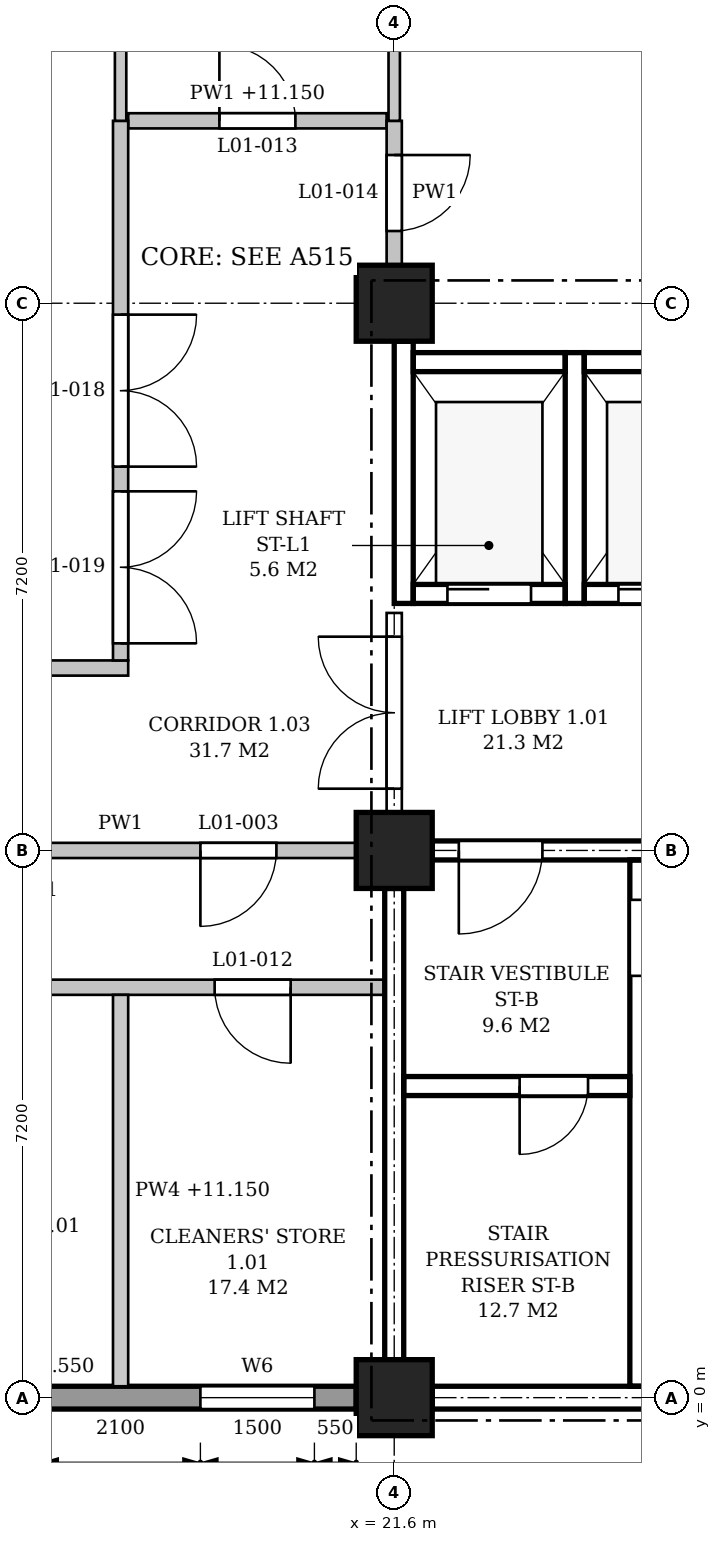
"""IFC4 building model, lengths in metres.
Left out: names, types, materials, properties, quantities, classifications, styles, units other than length and angle.
Written with IfcOpenShell. Run it as: python <this file> out.ifc"""

import sys

from ifc_helpers import new_model, si_unit, direction, frame, frame_2d, origin, origin_2d, place, context, subcontext, project, spatial, polyline, rectangle, outline, extrude, element, fill, save


model = new_model("IFC4")
c1 = context("Model", 3, precision=1e-05, world=origin(), true_north=direction((0.0, 1.0)))
c2 = subcontext(c1, "Body", "Model", "MODEL_VIEW")
j1 = project(units=[si_unit("LENGTHUNIT", "METRE"), si_unit("PLANEANGLEUNIT", "RADIAN")], contexts=[c1])
p1 = place(None, origin())
s1 = spatial("IfcSite", under=j1, at=p1, CompositionType="ELEMENT")
p2 = place(p1, origin())
s2 = spatial("IfcBuilding", under=s1, at=p2, CompositionType="ELEMENT")
p3 = place(p2, frame((0.0, 0.0, 6.0)))
s3 = spatial("IfcBuildingStorey", under=s2, at=p3, CompositionType="ELEMENT", Elevation=6.0)
for number, where, z_axis, x_axis in (
    (1, (21.6, 0.0, 0.0), (0.0, 0.0, 1.0), (1.0, 0.0, 0.0)),
    (2, (21.6, 7.2, 0.0), (0.0, 0.0, 1.0), (1.0, 0.0, 0.0)),
    (3, (21.6, 14.4, 0.0), (0.0, 0.0, 1.0), (1.0, 0.0, 0.0)),
):
    element("IfcColumn", number, at=place(p3, frame(where, z_axis=z_axis, x_axis=x_axis)), inside=s3, PredefinedType="COLUMN", context=c2, shape_type="SweptSolid", body=[
        extrude(rectangle(XDim=1.0, YDim=1.0, at=origin_2d()), origin(), (0.0, 0.0, 1.0), 5.4),
    ])
p4 = place(p3, frame((14.9, 0.0, 0.0), z_axis=(0.0, 0.0, 1.0), x_axis=(1.0, 0.0, 0.0)))
e4 = element("IfcWall", 4, at=p4, inside=s3, PredefinedType="STANDARD", context=c2, shape_type="SweptSolid", body=[
    extrude(rectangle(XDim=6.2, YDim=0.3, at=frame_2d((3.1, 0.0))), origin(), (0.0, 0.0, 1.0), 4.55),
])
p5 = place(p4, frame((0.55, 0.0, 0.9)))
e5 = element("IfcOpeningElement", 5, at=p5, cuts=e4, PredefinedType="OPENING", context=c2, shape_type="SweptSolid", body=[
    extrude(outline(polyline([(0.0, 0.0), (1.5, 0.0), (1.5, 2.85), (0.75, 3.6), (0.0, 2.85), (0.0, 0.0)])), frame((0.0, 0.16, 0.0), z_axis=(0.0, -1.0, 0.0), x_axis=(1.0, 0.0, 0.0)), (0.0, 0.0, 1.0), 0.32),
])
p6 = place(p4, frame((4.15, 0.0, 0.9)))
e6 = element("IfcOpeningElement", 6, at=p6, cuts=e4, PredefinedType="OPENING", context=c2, shape_type="SweptSolid", body=[
    extrude(outline(polyline([(0.0, 0.0), (1.5, 0.0), (1.5, 2.85), (0.75, 3.6), (0.0, 2.85), (0.0, 0.0)])), frame((0.0, 0.16, 0.0), z_axis=(0.0, -1.0, 0.0), x_axis=(1.0, 0.0, 0.0)), (0.0, 0.0, 1.0), 0.32),
])
p7 = place(p3, frame((22.1, 0.0, 0.0), z_axis=(0.0, 0.0, 1.0), x_axis=(1.0, 0.0, 0.0)))
e7 = element("IfcWall", 7, at=p7, inside=s3, PredefinedType="STANDARD", context=c2, shape_type="SweptSolid", body=[
    extrude(rectangle(XDim=6.2, YDim=0.3, at=frame_2d((3.1, 0.0))), origin(), (0.0, 0.0, 1.0), 4.55),
])
p8 = place(p7, frame((4.45, 0.0, 0.9)))
e8 = element("IfcOpeningElement", 8, at=p8, cuts=e7, PredefinedType="OPENING", context=c2, shape_type="SweptSolid", body=[
    extrude(outline(polyline([(0.0, 0.0), (0.9, 0.0), (0.9, 3.15), (0.45, 3.6), (0.0, 3.15), (0.0, 0.0)])), frame((0.0, 0.16, 0.0), z_axis=(0.0, -1.0, 0.0), x_axis=(1.0, 0.0, 0.0)), (0.0, 0.0, 1.0), 0.32),
])
p9 = place(p3, frame((22.1, 7.2, 0.0), z_axis=(0.0, 0.0, 1.0), x_axis=(1.0, 0.0, 0.0)))
e9 = element("IfcWall", 9, at=p9, inside=s3, PredefinedType="SHEAR", context=c2, shape_type="SweptSolid", body=[
    extrude(rectangle(XDim=6.2, YDim=0.25, at=frame_2d((3.1, 0.0))), origin(), (0.0, 0.0, 1.0), 4.4),
])
p10 = place(p9, frame((0.35, 0.0, 0.0)))
e10 = element("IfcOpeningElement", 10, at=p10, cuts=e9, PredefinedType="OPENING", context=c2, shape_type="SweptSolid", body=[
    extrude(rectangle(XDim=1.1, YDim=2.1, at=frame_2d((0.55, 1.05))), frame((0.0, 0.135, 0.0), z_axis=(0.0, -1.0, 0.0), x_axis=(1.0, 0.0, 0.0)), (0.0, 0.0, 1.0), 0.27),
])
p11 = place(p3, frame((21.6, 0.5, 0.0), z_axis=(0.0, 0.0, 1.0), x_axis=(0.0, 1.0, 0.0)))
e11 = element("IfcWall", 11, at=p11, inside=s3, PredefinedType="SHEAR", context=c2, shape_type="SweptSolid", body=[
    extrude(rectangle(XDim=6.2, YDim=0.25, at=frame_2d((3.1, 0.0))), origin(), (0.0, 0.0, 1.0), 4.4),
])
p12 = place(p3, frame((24.925, 0.15, 0.0), z_axis=(0.0, 0.0, 1.0), x_axis=(0.0, 1.0, 0.0)))
e12 = element("IfcWall", 12, at=p12, inside=s3, PredefinedType="SHEAR", context=c2, shape_type="SweptSolid", body=[
    extrude(rectangle(XDim=6.925, YDim=0.45, at=frame_2d((3.462, 0.0))), origin(), (0.0, 0.0, 1.0), 5.15),
])
p13 = place(p12, frame((5.4, 0.0, 0.0)))
e13 = element("IfcOpeningElement", 13, at=p13, cuts=e12, PredefinedType="OPENING", context=c2, shape_type="SweptSolid", body=[
    extrude(rectangle(XDim=1.0, YDim=2.1, at=frame_2d((0.5, 1.05))), frame((0.0, 0.235, 0.0), z_axis=(0.0, -1.0, 0.0), x_axis=(1.0, 0.0, 0.0)), (0.0, 0.0, 1.0), 0.47),
])
p14 = place(p3, frame((21.725, 4.1, 0.0), z_axis=(0.0, 0.0, 1.0), x_axis=(1.0, 0.0, 0.0)))
e14 = element("IfcWall", 14, at=p14, inside=s3, PredefinedType="SHEAR", context=c2, shape_type="SweptSolid", body=[
    extrude(rectangle(XDim=2.975, YDim=0.25, at=frame_2d((1.487, 0.0))), origin(), (0.0, 0.0, 1.0), 5.15),
])
p15 = place(p14, frame((1.525, 0.0, 0.0)))
e15 = element("IfcOpeningElement", 15, at=p15, cuts=e14, PredefinedType="OPENING", context=c2, shape_type="SweptSolid", body=[
    extrude(rectangle(XDim=0.9, YDim=2.1, at=frame_2d((0.45, 1.05))), frame((0.0, 0.135, 0.0), z_axis=(0.0, -1.0, 0.0), x_axis=(1.0, 0.0, 0.0)), (0.0, 0.0, 1.0), 0.27),
])
p16 = place(p3, frame((21.725, 10.45, -0.25), z_axis=(0.0, 0.0, 1.0), x_axis=(0.0, 1.0, 0.0)))
e16 = element("IfcWall", 16, at=p16, inside=s3, PredefinedType="SHEAR", context=c2, shape_type="SweptSolid", body=[
    extrude(rectangle(XDim=3.45, YDim=0.25, at=frame_2d((1.725, 0.0))), origin(), (0.0, 0.0, 1.0), 4.65),
])
p17 = place(p3, frame((23.975, 10.45, -0.25), z_axis=(0.0, 0.0, 1.0), x_axis=(0.0, 1.0, 0.0)))
e17 = element("IfcWall", 17, at=p17, inside=s3, PredefinedType="SHEAR", context=c2, shape_type="SweptSolid", body=[
    extrude(rectangle(XDim=3.3, YDim=0.25, at=frame_2d((1.65, 0.0))), origin(), (0.0, 0.0, 1.0), 5.4),
])
p18 = place(p3, frame((21.85, 10.575, -0.25), z_axis=(0.0, 0.0, 1.0), x_axis=(1.0, 0.0, 0.0)))
e18 = element("IfcWall", 18, at=p18, inside=s3, PredefinedType="SHEAR", context=c2, shape_type="SweptSolid", body=[
    extrude(rectangle(XDim=2.0, YDim=0.25, at=frame_2d((1.0, 0.0))), origin(), (0.0, 0.0, 1.0), 5.4),
])
p19 = place(p18, frame((0.45, 0.0, 0.25)))
e19 = element("IfcOpeningElement", 19, at=p19, cuts=e18, PredefinedType="OPENING", context=c2, shape_type="SweptSolid", body=[
    extrude(rectangle(XDim=1.1, YDim=2.1, at=frame_2d((0.55, 1.05))), frame((0.0, 0.135, 0.0), z_axis=(0.0, -1.0, 0.0), x_axis=(1.0, 0.0, 0.0)), (0.0, 0.0, 1.0), 0.27),
])
p20 = place(p3, frame((21.85, 13.625, -0.25), z_axis=(0.0, 0.0, 1.0), x_axis=(1.0, 0.0, 0.0)))
e20 = element("IfcWall", 20, at=p20, inside=s3, PredefinedType="SHEAR", context=c2, shape_type="SweptSolid", body=[
    extrude(rectangle(XDim=2.0, YDim=0.25, at=frame_2d((1.0, 0.0))), origin(), (0.0, 0.0, 1.0), 5.4),
])
p21 = place(p3, frame((24.1, 10.575, -0.25), z_axis=(0.0, 0.0, 1.0), x_axis=(1.0, 0.0, 0.0)))
e21 = element("IfcWall", 21, at=p21, inside=s3, PredefinedType="SHEAR", context=c2, shape_type="SweptSolid", body=[
    extrude(rectangle(XDim=2.0, YDim=0.25, at=frame_2d((1.0, 0.0))), origin(), (0.0, 0.0, 1.0), 5.4),
])
p22 = place(p21, frame((0.45, 0.0, 0.25)))
e22 = element("IfcOpeningElement", 22, at=p22, cuts=e21, PredefinedType="OPENING", context=c2, shape_type="SweptSolid", body=[
    extrude(rectangle(XDim=1.1, YDim=2.1, at=frame_2d((0.55, 1.05))), frame((0.0, 0.135, 0.0), z_axis=(0.0, -1.0, 0.0), x_axis=(1.0, 0.0, 0.0)), (0.0, 0.0, 1.0), 0.27),
])
p23 = place(p3, frame((24.1, 13.625, -0.25), z_axis=(0.0, 0.0, 1.0), x_axis=(1.0, 0.0, 0.0)))
e23 = element("IfcWall", 23, at=p23, inside=s3, PredefinedType="SHEAR", context=c2, shape_type="SweptSolid", body=[
    extrude(rectangle(XDim=2.0, YDim=0.25, at=frame_2d((1.0, 0.0))), origin(), (0.0, 0.0, 1.0), 5.4),
])
p24 = place(p3, frame((7.325, 5.4, 0.0), z_axis=(0.0, 0.0, 1.0), x_axis=(1.0, 0.0, 0.0)))
e24 = element("IfcWall", 24, at=p24, inside=s3, PredefinedType="PARTITIONING", context=c2, shape_type="SweptSolid", body=[
    extrude(outline(polyline([(0.0, 0.0), (14.15, 0.0), (14.15, 4.4), (14.025, 4.4), (14.025, 5.15), (7.325, 5.15), (7.325, 4.4), (6.825, 4.4), (6.825, 5.15), (0.125, 5.15), (0.125, 4.4), (0.0, 4.4), (0.0, 0.0)])), frame((0.0, 0.1, 0.0), z_axis=(0.0, -1.0, 0.0), x_axis=(1.0, 0.0, 0.0)), (0.0, 0.0, 1.0), 0.2),
])
p25 = place(p24, frame((1.238, 0.0, 0.0)))
e25 = element("IfcOpeningElement", 25, at=p25, cuts=e24, PredefinedType="OPENING", context=c2, shape_type="SweptSolid", body=[
    extrude(rectangle(XDim=1.0, YDim=2.1, at=frame_2d((0.5, 1.05))), frame((0.0, 0.11, 0.0), z_axis=(0.0, -1.0, 0.0), x_axis=(1.0, 0.0, 0.0)), (0.0, 0.0, 1.0), 0.22),
])
p26 = place(p24, frame((4.775, 0.0, 0.0)))
e26 = element("IfcOpeningElement", 26, at=p26, cuts=e24, PredefinedType="OPENING", context=c2, shape_type="SweptSolid", body=[
    extrude(rectangle(XDim=1.0, YDim=2.1, at=frame_2d((0.5, 1.05))), frame((0.0, 0.11, 0.0), z_axis=(0.0, -1.0, 0.0), x_axis=(1.0, 0.0, 0.0)), (0.0, 0.0, 1.0), 0.22),
])
p27 = place(p24, frame((8.375, 0.0, 0.0)))
e27 = element("IfcOpeningElement", 27, at=p27, cuts=e24, PredefinedType="OPENING", context=c2, shape_type="SweptSolid", body=[
    extrude(rectangle(XDim=1.0, YDim=2.1, at=frame_2d((0.5, 1.05))), frame((0.0, 0.11, 0.0), z_axis=(0.0, -1.0, 0.0), x_axis=(1.0, 0.0, 0.0)), (0.0, 0.0, 1.0), 0.22),
])
p28 = place(p24, frame((11.913, 0.0, 0.0)))
e28 = element("IfcOpeningElement", 28, at=p28, cuts=e24, PredefinedType="OPENING", context=c2, shape_type="SweptSolid", body=[
    extrude(rectangle(XDim=1.0, YDim=2.1, at=frame_2d((0.5, 1.05))), frame((0.0, 0.11, 0.0), z_axis=(0.0, -1.0, 0.0), x_axis=(1.0, 0.0, 0.0)), (0.0, 0.0, 1.0), 0.22),
])
p29 = place(p3, frame((14.9, 7.2, 0.0), z_axis=(0.0, 0.0, 1.0), x_axis=(1.0, 0.0, 0.0)))
e29 = element("IfcWall", 29, at=p29, inside=s3, PredefinedType="PARTITIONING", context=c2, shape_type="SweptSolid", body=[
    extrude(rectangle(XDim=6.2, YDim=0.2, at=frame_2d((3.1, 0.0))), origin(), (0.0, 0.0, 1.0), 4.4),
])
p30 = place(p29, frame((4.15, 0.0, 0.0)))
e30 = element("IfcOpeningElement", 30, at=p30, cuts=e29, PredefinedType="OPENING", context=c2, shape_type="SweptSolid", body=[
    extrude(rectangle(XDim=1.0, YDim=2.1, at=frame_2d((0.5, 1.05))), frame((0.0, 0.11, 0.0), z_axis=(0.0, -1.0, 0.0), x_axis=(1.0, 0.0, 0.0)), (0.0, 0.0, 1.0), 0.22),
])
p31 = place(p3, frame((3.5, 9.6, 0.0), z_axis=(0.0, 0.0, 1.0), x_axis=(1.0, 0.0, 0.0)))
e31 = element("IfcWall", 31, at=p31, inside=s3, PredefinedType="PARTITIONING", context=c2, shape_type="SweptSolid", body=[
    extrude(outline(polyline([(0.0, 0.0), (14.6, 0.0), (14.6, 5.15), (11.15, 5.15), (11.15, 4.4), (10.65, 4.4), (10.65, 5.15), (3.95, 5.15), (3.95, 4.4), (3.45, 4.4), (3.45, 5.15), (0.0, 5.15), (0.0, 0.0)])), frame((0.0, 0.1, 0.0), z_axis=(0.0, -1.0, 0.0), x_axis=(1.0, 0.0, 0.0)), (0.0, 0.0, 1.0), 0.2),
])
p32 = place(p31, frame((1.4, 0.0, 0.0)))
e32 = element("IfcOpeningElement", 32, at=p32, cuts=e31, PredefinedType="OPENING", context=c2, shape_type="SweptSolid", body=[
    extrude(rectangle(XDim=1.0, YDim=2.1, at=frame_2d((0.5, 1.05))), frame((0.0, 0.11, 0.0), z_axis=(0.0, -1.0, 0.0), x_axis=(1.0, 0.0, 0.0)), (0.0, 0.0, 1.0), 0.22),
])
p33 = place(p31, frame((5.0, 0.0, 0.0)))
e33 = element("IfcOpeningElement", 33, at=p33, cuts=e31, PredefinedType="OPENING", context=c2, shape_type="SweptSolid", body=[
    extrude(rectangle(XDim=1.0, YDim=2.1, at=frame_2d((0.5, 1.05))), frame((0.0, 0.11, 0.0), z_axis=(0.0, -1.0, 0.0), x_axis=(1.0, 0.0, 0.0)), (0.0, 0.0, 1.0), 0.22),
])
p34 = place(p3, frame((18.1, 16.8, 0.0), z_axis=(0.0, 0.0, 1.0), x_axis=(1.0, 0.0, 0.0)))
e34 = element("IfcWall", 34, at=p34, inside=s3, PredefinedType="PARTITIONING", context=c2, shape_type="SweptSolid", body=[
    extrude(outline(polyline([(0.0, 0.0), (3.4, 0.0), (3.4, 4.4), (3.25, 4.4), (3.25, 5.15), (0.0, 5.15), (0.0, 0.0)])), frame((0.0, 0.1, 0.0), z_axis=(0.0, -1.0, 0.0), x_axis=(1.0, 0.0, 0.0)), (0.0, 0.0, 1.0), 0.2),
])
p35 = place(p34, frame((1.2, 0.0, 0.0)))
e35 = element("IfcOpeningElement", 35, at=p35, cuts=e34, PredefinedType="OPENING", context=c2, shape_type="SweptSolid", body=[
    extrude(rectangle(XDim=1.0, YDim=2.1, at=frame_2d((0.5, 1.05))), frame((0.0, 0.11, 0.0), z_axis=(0.0, -1.0, 0.0), x_axis=(1.0, 0.0, 0.0)), (0.0, 0.0, 1.0), 0.22),
])
p36 = place(p3, frame((18.0, 0.15, 0.0), z_axis=(0.0, 0.0, 1.0), x_axis=(0.0, 1.0, 0.0)))
e36 = element("IfcWall", 36, at=p36, inside=s3, PredefinedType="PARTITIONING", context=c2, shape_type="SweptSolid", body=[
    extrude(outline(polyline([(0.0, 0.0), (5.15, 0.0), (5.15, 5.15), (0.1, 5.15), (0.1, 4.55), (0.0, 4.55), (0.0, 0.0)])), frame((0.0, 0.1, 0.0), z_axis=(0.0, -1.0, 0.0), x_axis=(1.0, 0.0, 0.0)), (0.0, 0.0, 1.0), 0.2),
])
p37 = place(p3, frame((18.0, 9.7, 0.0), z_axis=(0.0, 0.0, 1.0), x_axis=(0.0, 1.0, 0.0)))
e37 = element("IfcWall", 37, at=p37, inside=s3, PredefinedType="PARTITIONING", context=c2, shape_type="SweptSolid", body=[
    extrude(outline(polyline([(0.0, 0.0), (7.1, 0.0), (7.1, 5.15), (4.95, 5.15), (4.95, 4.4), (4.45, 4.4), (4.45, 5.15), (0.0, 5.15), (0.0, 0.0)])), frame((0.0, 0.1, 0.0), z_axis=(0.0, -1.0, 0.0), x_axis=(1.0, 0.0, 0.0)), (0.0, 0.0, 1.0), 0.2),
])
p38 = place(p37, frame((2.55, 0.0, 0.0)))
e38 = element("IfcOpeningElement", 38, at=p38, cuts=e37, PredefinedType="OPENING", context=c2, shape_type="SweptSolid", body=[
    extrude(rectangle(XDim=2.0, YDim=2.1, at=frame_2d((1.0, 1.05))), frame((0.0, 0.11, 0.0), z_axis=(0.0, -1.0, 0.0), x_axis=(1.0, 0.0, 0.0)), (0.0, 0.0, 1.0), 0.22),
])
p39 = place(p37, frame((0.225, 0.0, 0.0)))
e39 = element("IfcOpeningElement", 39, at=p39, cuts=e37, PredefinedType="OPENING", context=c2, shape_type="SweptSolid", body=[
    extrude(rectangle(XDim=2.0, YDim=2.1, at=frame_2d((1.0, 1.05))), frame((0.0, 0.11, 0.0), z_axis=(0.0, -1.0, 0.0), x_axis=(1.0, 0.0, 0.0)), (0.0, 0.0, 1.0), 0.22),
])
p40 = place(p3, frame((18.0, 16.8, 0.0), z_axis=(0.0, 0.0, 1.0), x_axis=(0.0, 1.0, 0.0)))
e40 = element("IfcWall", 40, at=p40, inside=s3, PredefinedType="PARTITIONING", context=c2, shape_type="SweptSolid", body=[
    extrude(rectangle(XDim=4.65, YDim=0.15, at=frame_2d((2.325, 0.0))), origin(), (0.0, 0.0, 1.0), 4.4),
])
p41 = place(p3, frame((21.6, 7.7, 0.0), z_axis=(0.0, 0.0, 1.0), x_axis=(0.0, 1.0, 0.0)))
e41 = element("IfcWall", 41, at=p41, inside=s3, PredefinedType="PARTITIONING", context=c2, shape_type="SweptSolid", body=[
    extrude(rectangle(XDim=2.625, YDim=0.2, at=frame_2d((1.312, 0.0))), origin(), (0.0, 0.0, 1.0), 4.4),
])
p42 = place(p41, frame((0.312, 0.0, 0.0)))
e42 = element("IfcOpeningElement", 42, at=p42, cuts=e41, PredefinedType="OPENING", context=c2, shape_type="SweptSolid", body=[
    extrude(rectangle(XDim=2.0, YDim=2.4, at=frame_2d((1.0, 1.2))), frame((0.0, 0.11, 0.0), z_axis=(0.0, -1.0, 0.0), x_axis=(1.0, 0.0, 0.0)), (0.0, 0.0, 1.0), 0.22),
])
p43 = place(p3, frame((21.6, 14.9, 0.0), z_axis=(0.0, 0.0, 1.0), x_axis=(0.0, 1.0, 0.0)))
e43 = element("IfcWall", 43, at=p43, inside=s3, PredefinedType="PARTITIONING", context=c2, shape_type="SweptSolid", body=[
    extrude(rectangle(XDim=1.9, YDim=0.2, at=frame_2d((0.95, 0.0))), origin(), (0.0, 0.0, 1.0), 4.4),
])
p44 = place(p43, frame((0.45, 0.0, 0.0)))
e44 = element("IfcOpeningElement", 44, at=p44, cuts=e43, PredefinedType="OPENING", context=c2, shape_type="SweptSolid", body=[
    extrude(rectangle(XDim=1.0, YDim=2.1, at=frame_2d((0.5, 1.05))), frame((0.0, 0.11, 0.0), z_axis=(0.0, -1.0, 0.0), x_axis=(1.0, 0.0, 0.0)), (0.0, 0.0, 1.0), 0.22),
])
p45 = place(p3, frame((21.6, 16.8, 0.0), z_axis=(0.0, 0.0, 1.0), x_axis=(0.0, 1.0, 0.0)))
e45 = element("IfcWall", 45, at=p45, inside=s3, PredefinedType="PARTITIONING", context=c2, shape_type="SweptSolid", body=[
    extrude(rectangle(XDim=4.3, YDim=0.15, at=frame_2d((2.15, 0.0))), origin(), (0.0, 0.0, 1.0), 4.4),
])
p46 = place(p6, origin())
e46 = element("IfcWindow", 46, at=p46, inside=s3, PartitioningType="SINGLE_PANEL", PredefinedType="WINDOW", context=c2, shape_type="SweptSolid", body=[
    extrude(outline(polyline([(0.0, 0.0), (1.5, 0.0), (1.5, 2.85), (0.75, 3.6), (0.0, 2.85), (0.0, 0.0)])), frame((0.0, 0.03, 0.0), z_axis=(0.0, -1.0, 0.0), x_axis=(1.0, 0.0, 0.0)), (0.0, 0.0, 1.0), 0.06),
])
fill(e6, e46)
p47 = place(p10, frame((1.1, 0.0, 0.0), z_axis=(0.0, 0.0, 1.0), x_axis=(-1.0, 0.0, 0.0)))
e47 = element("IfcDoor", 47, at=p47, inside=s3, OperationType="SINGLE_SWING_RIGHT", PredefinedType="DOOR", context=c2, shape_type="SweptSolid", body=[
    extrude(rectangle(XDim=1.1, YDim=2.1, at=frame_2d((0.55, 1.05))), frame((0.0, 0.025, 0.0), z_axis=(0.0, -1.0, 0.0), x_axis=(1.0, 0.0, 0.0)), (0.0, 0.0, 1.0), 0.05),
])
fill(e10, e47)
p48 = place(p15, frame((0.9, 0.0, 0.0), z_axis=(0.0, 0.0, 1.0), x_axis=(-1.0, 0.0, 0.0)))
e48 = element("IfcDoor", 48, at=p48, inside=s3, OperationType="SINGLE_SWING_RIGHT", PredefinedType="DOOR", context=c2, shape_type="SweptSolid", body=[
    extrude(rectangle(XDim=0.9, YDim=2.1, at=frame_2d((0.45, 1.05))), frame((0.0, 0.025, 0.0), z_axis=(0.0, -1.0, 0.0), x_axis=(1.0, 0.0, 0.0)), (0.0, 0.0, 1.0), 0.05),
])
fill(e15, e48)
p49 = place(p19, origin())
e49 = element("IfcDoor", 49, at=p49, inside=s3, OperationType="SLIDING_TO_LEFT", PredefinedType="DOOR", context=c2, shape_type="SweptSolid", body=[
    extrude(rectangle(XDim=1.1, YDim=2.1, at=frame_2d((0.55, 1.05))), frame((0.0, 0.025, 0.0), z_axis=(0.0, -1.0, 0.0), x_axis=(1.0, 0.0, 0.0)), (0.0, 0.0, 1.0), 0.05),
])
fill(e19, e49)
p50 = place(p22, origin())
e50 = element("IfcDoor", 50, at=p50, inside=s3, OperationType="SLIDING_TO_LEFT", PredefinedType="DOOR", context=c2, shape_type="SweptSolid", body=[
    extrude(rectangle(XDim=1.1, YDim=2.1, at=frame_2d((0.55, 1.05))), frame((0.0, 0.025, 0.0), z_axis=(0.0, -1.0, 0.0), x_axis=(1.0, 0.0, 0.0)), (0.0, 0.0, 1.0), 0.05),
])
fill(e22, e50)
p51 = place(p42, origin())
e51 = element("IfcDoor", 51, at=p51, inside=s3, OperationType="DOUBLE_DOOR_SINGLE_SWING", PredefinedType="DOOR", context=c2, shape_type="SweptSolid", body=[
    extrude(rectangle(XDim=2.0, YDim=2.4, at=frame_2d((1.0, 1.2))), frame((0.0, 0.025, 0.0), z_axis=(0.0, -1.0, 0.0), x_axis=(1.0, 0.0, 0.0)), (0.0, 0.0, 1.0), 0.05),
])
fill(e42, e51)
p52 = place(p30, frame((1.0, 0.0, 0.0), z_axis=(0.0, 0.0, 1.0), x_axis=(-1.0, 0.0, 0.0)))
e52 = element("IfcDoor", 52, at=p52, inside=s3, OperationType="SINGLE_SWING_RIGHT", PredefinedType="DOOR", context=c2, shape_type="SweptSolid", body=[
    extrude(rectangle(XDim=1.0, YDim=2.1, at=frame_2d((0.5, 1.05))), frame((0.0, 0.025, 0.0), z_axis=(0.0, -1.0, 0.0), x_axis=(1.0, 0.0, 0.0)), (0.0, 0.0, 1.0), 0.05),
])
fill(e30, e52)
p53 = place(p28, frame((1.0, 0.0, 0.0), z_axis=(0.0, 0.0, 1.0), x_axis=(-1.0, 0.0, 0.0)))
e53 = element("IfcDoor", 53, at=p53, inside=s3, OperationType="SINGLE_SWING_LEFT", PredefinedType="DOOR", context=c2, shape_type="SweptSolid", body=[
    extrude(rectangle(XDim=1.0, YDim=2.1, at=frame_2d((0.5, 1.05))), frame((0.0, 0.025, 0.0), z_axis=(0.0, -1.0, 0.0), x_axis=(1.0, 0.0, 0.0)), (0.0, 0.0, 1.0), 0.05),
])
fill(e28, e53)
p54 = place(p35, origin())
e54 = element("IfcDoor", 54, at=p54, inside=s3, OperationType="SINGLE_SWING_LEFT", PredefinedType="DOOR", context=c2, shape_type="SweptSolid", body=[
    extrude(rectangle(XDim=1.0, YDim=2.1, at=frame_2d((0.5, 1.05))), frame((0.0, 0.025, 0.0), z_axis=(0.0, -1.0, 0.0), x_axis=(1.0, 0.0, 0.0)), (0.0, 0.0, 1.0), 0.05),
])
fill(e35, e54)
p55 = place(p44, frame((1.0, 0.0, 0.0), z_axis=(0.0, 0.0, 1.0), x_axis=(-1.0, 0.0, 0.0)))
e55 = element("IfcDoor", 55, at=p55, inside=s3, OperationType="SINGLE_SWING_LEFT", PredefinedType="DOOR", context=c2, shape_type="SweptSolid", body=[
    extrude(rectangle(XDim=1.0, YDim=2.1, at=frame_2d((0.5, 1.05))), frame((0.0, 0.025, 0.0), z_axis=(0.0, -1.0, 0.0), x_axis=(1.0, 0.0, 0.0)), (0.0, 0.0, 1.0), 0.05),
])
fill(e44, e55)
p56 = place(p38, origin())
e56 = element("IfcDoor", 56, at=p56, inside=s3, OperationType="DOUBLE_DOOR_SINGLE_SWING", PredefinedType="DOOR", context=c2, shape_type="SweptSolid", body=[
    extrude(rectangle(XDim=2.0, YDim=2.1, at=frame_2d((1.0, 1.05))), frame((0.0, 0.025, 0.0), z_axis=(0.0, -1.0, 0.0), x_axis=(1.0, 0.0, 0.0)), (0.0, 0.0, 1.0), 0.05),
])
fill(e38, e56)
p57 = place(p39, origin())
e57 = element("IfcDoor", 57, at=p57, inside=s3, OperationType="DOUBLE_DOOR_SINGLE_SWING", PredefinedType="DOOR", context=c2, shape_type="SweptSolid", body=[
    extrude(rectangle(XDim=2.0, YDim=2.1, at=frame_2d((1.0, 1.05))), frame((0.0, 0.025, 0.0), z_axis=(0.0, -1.0, 0.0), x_axis=(1.0, 0.0, 0.0)), (0.0, 0.0, 1.0), 0.05),
])
fill(e39, e57)
save(model, sys.argv[1])
